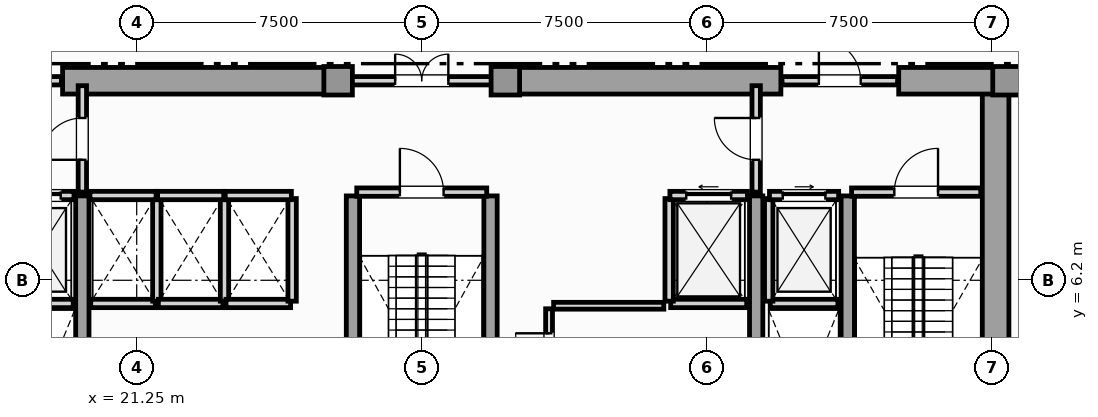
"""IFC4 building model, lengths in metres.
Left out: names, types, materials, properties, quantities, classifications, styles, units other than length and angle.
Written with IfcOpenShell. Run it as: python <this file> out.ifc"""

import sys

from ifc_helpers import new_model, si_unit, direction, frame, frame_2d, origin, origin_2d, place, context, subcontext, project, spatial, rectangle, extrude, element, fill, save


model = new_model("IFC4")
c1 = context("Model", 3, precision=1e-05, world=origin(), true_north=direction((0.0, 1.0)))
c2 = subcontext(c1, "Body", "Model", "MODEL_VIEW")
j1 = project(units=[si_unit("LENGTHUNIT", "METRE"), si_unit("PLANEANGLEUNIT", "RADIAN")], contexts=[c1])
p1 = place(None, origin())
s1 = spatial("IfcSite", under=j1, at=p1, CompositionType="ELEMENT")
p2 = place(p1, origin())
s2 = spatial("IfcBuilding", under=s1, at=p2, CompositionType="ELEMENT")
p3 = place(p2, frame((0.0, 0.0, 96.45)))
s3 = spatial("IfcBuildingStorey", under=s2, at=p3, CompositionType="ELEMENT", Elevation=96.45)
p4 = place(p3, frame((43.85, 0.92, 0.0), z_axis=(0.0, 0.0, 1.0), x_axis=(0.0, 1.0, 0.0)))
e1 = element("IfcWall", 1, at=p4, inside=s3, PredefinedType="SHEAR", context=c2, shape_type="SweptSolid", body=[
    extrude(rectangle(XDim=10.53, YDim=0.7, at=frame_2d((5.265, 0.0))), origin(), (0.0, 0.0, 1.0), 3.6),
])
for number, where, z_axis, x_axis in (
    (2, (19.3, 11.45, 0.0), (0.0, 0.0, 1.0), (1.0, 0.0, 0.0)),
    (3, (30.9, 11.45, 0.0), (0.0, 0.0, 1.0), (1.0, 0.0, 0.0)),
):
    element("IfcWall", number, at=place(p3, frame(where, z_axis=z_axis, x_axis=x_axis)), inside=s3, PredefinedType="SHEAR", context=c2, shape_type="SweptSolid", body=[
        extrude(rectangle(XDim=7.3, YDim=0.7, at=frame_2d((3.65, 0.0))), origin(), (0.0, 0.0, 1.0), 3.6),
    ])
p5 = place(p3, frame((41.3, 11.45, 0.0), z_axis=(0.0, 0.0, 1.0), x_axis=(1.0, 0.0, 0.0)))
e4 = element("IfcWall", 4, at=p5, inside=s3, PredefinedType="SHEAR", context=c2, shape_type="SweptSolid", body=[
    extrude(rectangle(XDim=2.95, YDim=0.7, at=frame_2d((1.475, 0.0))), origin(), (0.0, 0.0, 1.0), 3.6),
])
for number, where, z_axis, x_axis in (
    (5, (19.82, 0.92, 0.0), (0.0, 0.0, 1.0), (0.0, 1.0, 0.0)),
    (6, (26.94, 0.92, 0.0), (0.0, 0.0, 1.0), (0.0, 1.0, 0.0)),
    (7, (30.56, 0.92, 0.0), (0.0, 0.0, 1.0), (0.0, 1.0, 0.0)),
    (8, (37.55, 0.92, 0.0), (0.0, 0.0, 1.0), (0.0, 1.0, 0.0)),
    (9, (39.96, 0.92, 0.0), (0.0, 0.0, 1.0), (0.0, 1.0, 0.0)),
):
    element("IfcWall", number, at=place(p3, frame(where, z_axis=z_axis, x_axis=x_axis)), inside=s3, PredefinedType="SHEAR", context=c2, shape_type="SweptSolid", body=[
        extrude(rectangle(XDim=7.5, YDim=0.35, at=frame_2d((3.75, 0.0))), origin(), (0.0, 0.0, 1.0), 3.6),
    ])
for number, where, z_axis, x_axis in (
    (10, (44.15, 11.45, 0.0), (0.0, 0.0, 1.0), (1.0, 0.0, 0.0)),
    (11, (26.55, 11.45, 0.0), (0.0, 0.0, 1.0), (1.0, 0.0, 0.0)),
    (12, (30.95, 11.45, 0.0), (0.0, 0.0, 1.0), (1.0, 0.0, 0.0)),
):
    element("IfcColumn", number, at=place(p3, frame(where, z_axis=z_axis, x_axis=x_axis)), inside=s3, PredefinedType="COLUMN", context=c2, shape_type="SweptSolid", body=[
        extrude(rectangle(XDim=0.75, YDim=0.75, at=origin_2d()), origin(), (0.0, 0.0, 1.0), 3.85),
    ])
p6 = place(p3, frame((17.8, 5.59, 0.0), z_axis=(0.0, 0.0, 1.0), x_axis=(1.0, 0.0, 0.0)))
e13 = element("IfcWall", 13, at=p6, inside=s3, PredefinedType="SOLIDWALL", context=c2, shape_type="SweptSolid", body=[
    extrude(rectangle(XDim=1.78, YDim=0.22, at=frame_2d((0.89, 0.0))), origin(), (0.0, 0.0, 1.0), 3.6),
])
p7 = place(p3, frame((17.78, 8.43, 0.0), z_axis=(0.0, 0.0, 1.0), x_axis=(1.0, 0.0, 0.0)))
e14 = element("IfcWall", 14, at=p7, inside=s3, PredefinedType="SOLIDWALL", context=c2, shape_type="SweptSolid", body=[
    extrude(rectangle(XDim=1.82, YDim=0.22, at=frame_2d((0.91, 0.0))), origin(), (0.0, 0.0, 1.0), 3.6),
])
p8 = place(p7, frame((0.35, 0.0, 0.0)))
e15 = element("IfcOpeningElement", 15, at=p8, cuts=e14, PredefinedType="OPENING", context=c2, shape_type="SweptSolid", body=[
    extrude(rectangle(XDim=1.12, YDim=2.25, at=frame_2d((0.56, 1.125))), frame((0.0, 0.12, 0.0), z_axis=(0.0, -1.0, 0.0), x_axis=(1.0, 0.0, 0.0)), (0.0, 0.0, 1.0), 0.24),
])
p9 = place(p3, frame((37.92, 5.59, 0.0), z_axis=(0.0, 0.0, 1.0), x_axis=(1.0, 0.0, 0.0)))
e16 = element("IfcWall", 16, at=p9, inside=s3, PredefinedType="SOLIDWALL", context=c2, shape_type="SweptSolid", body=[
    extrude(rectangle(XDim=1.78, YDim=0.22, at=frame_2d((0.89, 0.0))), origin(), (0.0, 0.0, 1.0), 3.6),
])
p10 = place(p3, frame((37.88, 5.65, 0.0), z_axis=(0.0, 0.0, 1.0), x_axis=(0.0, 1.0, 0.0)))
e17 = element("IfcWall", 17, at=p10, inside=s3, PredefinedType="SOLIDWALL", context=c2, shape_type="SweptSolid", body=[
    extrude(rectangle(XDim=2.7, YDim=0.22, at=frame_2d((1.35, 0.0))), origin(), (0.0, 0.0, 1.0), 3.6),
])
p11 = place(p3, frame((37.9, 8.43, 0.0), z_axis=(0.0, 0.0, 1.0), x_axis=(1.0, 0.0, 0.0)))
e18 = element("IfcWall", 18, at=p11, inside=s3, PredefinedType="SOLIDWALL", context=c2, shape_type="SweptSolid", body=[
    extrude(rectangle(XDim=1.82, YDim=0.22, at=frame_2d((0.91, 0.0))), origin(), (0.0, 0.0, 1.0), 3.6),
])
p12 = place(p11, frame((0.35, 0.0, 0.0)))
e19 = element("IfcOpeningElement", 19, at=p12, cuts=e18, PredefinedType="OPENING", context=c2, shape_type="SweptSolid", body=[
    extrude(rectangle(XDim=1.12, YDim=2.25, at=frame_2d((0.56, 1.125))), frame((0.0, 0.12, 0.0), z_axis=(0.0, -1.0, 0.0), x_axis=(1.0, 0.0, 0.0)), (0.0, 0.0, 1.0), 0.24),
])
p13 = place(p3, frame((35.3, 5.59, 0.0), z_axis=(0.0, 0.0, 1.0), x_axis=(1.0, 0.0, 0.0)))
e20 = element("IfcWall", 20, at=p13, inside=s3, PredefinedType="SOLIDWALL", context=c2, shape_type="SweptSolid", body=[
    extrude(rectangle(XDim=2.0, YDim=0.22, at=frame_2d((1.0, 0.0))), origin(), (0.0, 0.0, 1.0), 3.6),
])
p14 = place(p3, frame((35.26, 5.65, 0.0), z_axis=(0.0, 0.0, 1.0), x_axis=(0.0, 1.0, 0.0)))
e21 = element("IfcWall", 21, at=p14, inside=s3, PredefinedType="SOLIDWALL", context=c2, shape_type="SweptSolid", body=[
    extrude(rectangle(XDim=2.7, YDim=0.22, at=frame_2d((1.35, 0.0))), origin(), (0.0, 0.0, 1.0), 3.6),
])
p15 = place(p3, frame((35.28, 8.43, 0.0), z_axis=(0.0, 0.0, 1.0), x_axis=(1.0, 0.0, 0.0)))
e22 = element("IfcWall", 22, at=p15, inside=s3, PredefinedType="SOLIDWALL", context=c2, shape_type="SweptSolid", body=[
    extrude(rectangle(XDim=2.04, YDim=0.22, at=frame_2d((1.02, 0.0))), origin(), (0.0, 0.0, 1.0), 3.6),
])
p16 = place(p15, frame((0.43, 0.0, 0.0)))
e23 = element("IfcOpeningElement", 23, at=p16, cuts=e22, PredefinedType="OPENING", context=c2, shape_type="SweptSolid", body=[
    extrude(rectangle(XDim=1.18, YDim=2.2, at=frame_2d((0.59, 1.1))), frame((0.0, 0.12, 0.0), z_axis=(0.0, -1.0, 0.0), x_axis=(1.0, 0.0, 0.0)), (0.0, 0.0, 1.0), 0.24),
])
p17 = place(p3, frame((20.04, 5.59, 0.0), z_axis=(0.0, 0.0, 1.0), x_axis=(1.0, 0.0, 0.0)))
e24 = element("IfcWall", 24, at=p17, inside=s3, PredefinedType="SOLIDWALL", context=c2, shape_type="SweptSolid", body=[
    extrude(rectangle(XDim=1.7, YDim=0.22, at=frame_2d((0.85, 0.0))), origin(), (0.0, 0.0, 1.0), 3.6),
])
p18 = place(p3, frame((21.78, 5.65, 0.0), z_axis=(0.0, 0.0, 1.0), x_axis=(0.0, 1.0, 0.0)))
e25 = element("IfcWall", 25, at=p18, inside=s3, PredefinedType="SOLIDWALL", context=c2, shape_type="SweptSolid", body=[
    extrude(rectangle(XDim=2.7, YDim=0.22, at=frame_2d((1.35, 0.0))), origin(), (0.0, 0.0, 1.0), 3.6),
])
p19 = place(p3, frame((20.02, 8.43, 0.0), z_axis=(0.0, 0.0, 1.0), x_axis=(1.0, 0.0, 0.0)))
e26 = element("IfcWall", 26, at=p19, inside=s3, PredefinedType="SOLIDWALL", context=c2, shape_type="SweptSolid", body=[
    extrude(rectangle(XDim=1.74, YDim=0.22, at=frame_2d((0.87, 0.0))), origin(), (0.0, 0.0, 1.0), 3.6),
])
p20 = place(p3, frame((21.82, 5.59, 0.0), z_axis=(0.0, 0.0, 1.0), x_axis=(1.0, 0.0, 0.0)))
e27 = element("IfcWall", 27, at=p20, inside=s3, PredefinedType="SOLIDWALL", context=c2, shape_type="SweptSolid", body=[
    extrude(rectangle(XDim=1.7, YDim=0.22, at=frame_2d((0.85, 0.0))), origin(), (0.0, 0.0, 1.0), 3.6),
])
p21 = place(p3, frame((23.56, 5.65, 0.0), z_axis=(0.0, 0.0, 1.0), x_axis=(0.0, 1.0, 0.0)))
e28 = element("IfcWall", 28, at=p21, inside=s3, PredefinedType="SOLIDWALL", context=c2, shape_type="SweptSolid", body=[
    extrude(rectangle(XDim=2.7, YDim=0.22, at=frame_2d((1.35, 0.0))), origin(), (0.0, 0.0, 1.0), 3.6),
])
p22 = place(p3, frame((21.8, 8.43, 0.0), z_axis=(0.0, 0.0, 1.0), x_axis=(1.0, 0.0, 0.0)))
e29 = element("IfcWall", 29, at=p22, inside=s3, PredefinedType="SOLIDWALL", context=c2, shape_type="SweptSolid", body=[
    extrude(rectangle(XDim=1.74, YDim=0.22, at=frame_2d((0.87, 0.0))), origin(), (0.0, 0.0, 1.0), 3.6),
])
p23 = place(p3, frame((23.6, 5.59, 0.0), z_axis=(0.0, 0.0, 1.0), x_axis=(1.0, 0.0, 0.0)))
e30 = element("IfcWall", 30, at=p23, inside=s3, PredefinedType="SOLIDWALL", context=c2, shape_type="SweptSolid", body=[
    extrude(rectangle(XDim=1.7, YDim=0.22, at=frame_2d((0.85, 0.0))), origin(), (0.0, 0.0, 1.0), 3.6),
])
p24 = place(p3, frame((25.34, 5.65, 0.0), z_axis=(0.0, 0.0, 1.0), x_axis=(0.0, 1.0, 0.0)))
e31 = element("IfcWall", 31, at=p24, inside=s3, PredefinedType="SOLIDWALL", context=c2, shape_type="SweptSolid", body=[
    extrude(rectangle(XDim=2.7, YDim=0.22, at=frame_2d((1.35, 0.0))), origin(), (0.0, 0.0, 1.0), 3.6),
])
p25 = place(p3, frame((23.58, 8.43, 0.0), z_axis=(0.0, 0.0, 1.0), x_axis=(1.0, 0.0, 0.0)))
e32 = element("IfcWall", 32, at=p25, inside=s3, PredefinedType="SOLIDWALL", context=c2, shape_type="SweptSolid", body=[
    extrude(rectangle(XDim=1.74, YDim=0.22, at=frame_2d((0.87, 0.0))), origin(), (0.0, 0.0, 1.0), 3.6),
])
p26 = place(p3, frame((40.06, 8.52, 0.0), z_axis=(0.0, 0.0, 1.0), x_axis=(1.0, 0.0, 0.0)))
e33 = element("IfcWall", 33, at=p26, inside=s3, PredefinedType="SOLIDWALL", context=c2, shape_type="SweptSolid", body=[
    extrude(rectangle(XDim=3.4, YDim=0.22, at=frame_2d((1.7, 0.0))), origin(), (0.0, 0.0, 1.0), 3.6),
])
p27 = place(p26, frame((1.125, 0.0, 0.0)))
e34 = element("IfcOpeningElement", 34, at=p27, cuts=e33, PredefinedType="OPENING", context=c2, shape_type="SweptSolid", body=[
    extrude(rectangle(XDim=1.15, YDim=2.2, at=frame_2d((0.575, 1.1))), frame((0.0, 0.12, 0.0), z_axis=(0.0, -1.0, 0.0), x_axis=(1.0, 0.0, 0.0)), (0.0, 0.0, 1.0), 0.24),
])
p28 = place(p3, frame((27.04, 8.52, 0.0), z_axis=(0.0, 0.0, 1.0), x_axis=(1.0, 0.0, 0.0)))
e35 = element("IfcWall", 35, at=p28, inside=s3, PredefinedType="SOLIDWALL", context=c2, shape_type="SweptSolid", body=[
    extrude(rectangle(XDim=3.42, YDim=0.22, at=frame_2d((1.71, 0.0))), origin(), (0.0, 0.0, 1.0), 3.6),
])
p29 = place(p28, frame((1.135, 0.0, 0.0)))
e36 = element("IfcOpeningElement", 36, at=p29, cuts=e35, PredefinedType="OPENING", context=c2, shape_type="SweptSolid", body=[
    extrude(rectangle(XDim=1.15, YDim=2.2, at=frame_2d((0.575, 1.1))), frame((0.0, 0.12, 0.0), z_axis=(0.0, -1.0, 0.0), x_axis=(1.0, 0.0, 0.0)), (0.0, 0.0, 1.0), 0.24),
])
p30 = place(p3, frame((19.82, 8.52, 0.0), z_axis=(0.0, 0.0, 1.0), x_axis=(0.0, 1.0, 0.0)))
e37 = element("IfcWall", 37, at=p30, inside=s3, PredefinedType="SOLIDWALL", context=c2, shape_type="SweptSolid", body=[
    extrude(rectangle(XDim=2.8, YDim=0.22, at=frame_2d((1.4, 0.0))), origin(), (0.0, 0.0, 1.0), 3.056),
])
p31 = place(p30, frame((0.85, 0.0, 0.0)))
e38 = element("IfcOpeningElement", 38, at=p31, cuts=e37, PredefinedType="OPENING", context=c2, shape_type="SweptSolid", body=[
    extrude(rectangle(XDim=1.1, YDim=2.2, at=frame_2d((0.55, 1.1))), frame((0.0, 0.12, 0.0), z_axis=(0.0, -1.0, 0.0), x_axis=(1.0, 0.0, 0.0)), (0.0, 0.0, 1.0), 0.24),
])
p32 = place(p3, frame((37.55, 8.52, 0.0), z_axis=(0.0, 0.0, 1.0), x_axis=(0.0, 1.0, 0.0)))
e39 = element("IfcWall", 39, at=p32, inside=s3, PredefinedType="SOLIDWALL", context=c2, shape_type="SweptSolid", body=[
    extrude(rectangle(XDim=2.8, YDim=0.22, at=frame_2d((1.4, 0.0))), origin(), (0.0, 0.0, 1.0), 3.056),
])
p33 = place(p32, frame((0.85, 0.0, 0.0)))
e40 = element("IfcOpeningElement", 40, at=p33, cuts=e39, PredefinedType="OPENING", context=c2, shape_type="SweptSolid", body=[
    extrude(rectangle(XDim=1.1, YDim=2.2, at=frame_2d((0.55, 1.1))), frame((0.0, 0.12, 0.0), z_axis=(0.0, -1.0, 0.0), x_axis=(1.0, 0.0, 0.0)), (0.0, 0.0, 1.0), 0.24),
])
p34 = place(p3, frame((16.23, 11.45, 0.0), z_axis=(0.0, 0.0, 1.0), x_axis=(1.0, 0.0, 0.0)))
e41 = element("IfcWall", 41, at=p34, inside=s3, PredefinedType="SOLIDWALL", context=c2, shape_type="SweptSolid", body=[
    extrude(rectangle(XDim=3.04, YDim=0.22, at=frame_2d((1.52, 0.0))), origin(), (0.0, 0.0, 1.0), 3.6),
])
p35 = place(p34, frame((0.97, 0.0, 0.0)))
e42 = element("IfcOpeningElement", 42, at=p35, cuts=e41, PredefinedType="OPENING", context=c2, shape_type="SweptSolid", body=[
    extrude(rectangle(XDim=1.1, YDim=2.2, at=frame_2d((0.55, 1.1))), frame((0.0, 0.12, 0.0), z_axis=(0.0, -1.0, 0.0), x_axis=(1.0, 0.0, 0.0)), (0.0, 0.0, 1.0), 0.24),
])
p36 = place(p3, frame((26.63, 11.45, 0.0), z_axis=(0.0, 0.0, 1.0), x_axis=(1.0, 0.0, 0.0)))
e43 = element("IfcWall", 43, at=p36, inside=s3, PredefinedType="SOLIDWALL", context=c2, shape_type="SweptSolid", body=[
    extrude(rectangle(XDim=4.24, YDim=0.22, at=frame_2d((2.12, 0.0))), origin(), (0.0, 0.0, 1.0), 3.6),
])
p37 = place(p36, frame((1.42, 0.0, 0.0)))
e44 = element("IfcOpeningElement", 44, at=p37, cuts=e43, PredefinedType="OPENING", context=c2, shape_type="SweptSolid", body=[
    extrude(rectangle(XDim=1.4, YDim=2.2, at=frame_2d((0.7, 1.1))), frame((0.0, 0.12, 0.0), z_axis=(0.0, -1.0, 0.0), x_axis=(1.0, 0.0, 0.0)), (0.0, 0.0, 1.0), 0.24),
])
p38 = place(p3, frame((38.23, 11.45, 0.0), z_axis=(0.0, 0.0, 1.0), x_axis=(1.0, 0.0, 0.0)))
e45 = element("IfcWall", 45, at=p38, inside=s3, PredefinedType="SOLIDWALL", context=c2, shape_type="SweptSolid", body=[
    extrude(rectangle(XDim=3.04, YDim=0.22, at=frame_2d((1.52, 0.0))), origin(), (0.0, 0.0, 1.0), 3.6),
])
p39 = place(p38, frame((0.97, 0.0, 0.0)))
e46 = element("IfcOpeningElement", 46, at=p39, cuts=e45, PredefinedType="OPENING", context=c2, shape_type="SweptSolid", body=[
    extrude(rectangle(XDim=1.1, YDim=2.2, at=frame_2d((0.55, 1.1))), frame((0.0, 0.12, 0.0), z_axis=(0.0, -1.0, 0.0), x_axis=(1.0, 0.0, 0.0)), (0.0, 0.0, 1.0), 0.24),
])
p40 = place(p3, frame((32.1, 3.28, 0.0), z_axis=(0.0, 0.0, 1.0), x_axis=(0.0, 1.0, 0.0)))
e47 = element("IfcWall", 47, at=p40, inside=s3, PredefinedType="PARTITIONING", context=c2, shape_type="SweptSolid", body=[
    extrude(rectangle(XDim=2.17, YDim=0.18, at=frame_2d((1.085, 0.0))), origin(), (0.0, 0.0, 1.0), 3.6),
])
p41 = place(p40, frame((0.645, 0.0, 0.0)))
e48 = element("IfcOpeningElement", 48, at=p41, cuts=e47, PredefinedType="OPENING", context=c2, shape_type="SweptSolid", body=[
    extrude(rectangle(XDim=0.88, YDim=2.05, at=frame_2d((0.44, 1.025))), frame((0.0, 0.1, 0.0), z_axis=(0.0, -1.0, 0.0), x_axis=(1.0, 0.0, 0.0)), (0.0, 0.0, 1.0), 0.2),
])
p42 = place(p3, frame((32.22, 5.53, 0.0), z_axis=(0.0, 0.0, 1.0), x_axis=(1.0, 0.0, 0.0)))
e49 = element("IfcWall", 49, at=p42, inside=s3, PredefinedType="PARTITIONING", context=c2, shape_type="SweptSolid", body=[
    extrude(rectangle(XDim=2.9, YDim=0.18, at=frame_2d((1.45, 0.0))), origin(), (0.0, 0.0, 1.0), 3.6),
])
p43 = place(p3, frame((44.355, 11.6, 0.0), z_axis=(0.0, 0.0, 1.0), x_axis=(1.0, 0.0, 0.0)))
e50 = element("IfcWall", 50, at=p43, inside=s3, PredefinedType="PARTITIONING", context=c2, shape_type="SweptSolid", body=[
    extrude(rectangle(XDim=10.335, YDim=0.18, at=frame_2d((5.167, 0.0))), origin(), (0.0, 0.0, 1.0), 3.6),
])
p44 = place(p43, frame((4.667, 0.0, 0.0)))
e51 = element("IfcOpeningElement", 51, at=p44, cuts=e50, PredefinedType="OPENING", context=c2, shape_type="SweptSolid", body=[
    extrude(rectangle(XDim=1.0, YDim=2.15, at=frame_2d((0.5, 1.075))), frame((0.0, 0.1, 0.0), z_axis=(0.0, -1.0, 0.0), x_axis=(1.0, 0.0, 0.0)), (0.0, 0.0, 1.0), 0.2),
])
p45 = place(p8, origin())
e52 = element("IfcDoor", 52, at=p45, inside=s3, OperationType="SLIDING_TO_LEFT", PredefinedType="DOOR", context=c2, shape_type="SweptSolid", body=[
    extrude(rectangle(XDim=1.12, YDim=2.25, at=frame_2d((0.56, 1.125))), frame((0.0, 0.025, 0.0), z_axis=(0.0, -1.0, 0.0), x_axis=(1.0, 0.0, 0.0)), (0.0, 0.0, 1.0), 0.05),
])
fill(e15, e52)
p46 = place(p12, origin())
e53 = element("IfcDoor", 53, at=p46, inside=s3, OperationType="SLIDING_TO_RIGHT", PredefinedType="DOOR", context=c2, shape_type="SweptSolid", body=[
    extrude(rectangle(XDim=1.12, YDim=2.25, at=frame_2d((0.56, 1.125))), frame((0.0, 0.025, 0.0), z_axis=(0.0, -1.0, 0.0), x_axis=(1.0, 0.0, 0.0)), (0.0, 0.0, 1.0), 0.05),
])
fill(e19, e53)
p47 = place(p16, origin())
e54 = element("IfcDoor", 54, at=p47, inside=s3, OperationType="SLIDING_TO_LEFT", PredefinedType="DOOR", context=c2, shape_type="SweptSolid", body=[
    extrude(rectangle(XDim=1.18, YDim=2.2, at=frame_2d((0.59, 1.1))), frame((0.0, 0.025, 0.0), z_axis=(0.0, -1.0, 0.0), x_axis=(1.0, 0.0, 0.0)), (0.0, 0.0, 1.0), 0.05),
])
fill(e23, e54)
p48 = place(p27, origin())
e55 = element("IfcDoor", 55, at=p48, inside=s3, OperationType="SINGLE_SWING_RIGHT", PredefinedType="DOOR", context=c2, shape_type="SweptSolid", body=[
    extrude(rectangle(XDim=1.15, YDim=2.2, at=frame_2d((0.575, 1.1))), frame((0.0, 0.025, 0.0), z_axis=(0.0, -1.0, 0.0), x_axis=(1.0, 0.0, 0.0)), (0.0, 0.0, 1.0), 0.05),
])
fill(e34, e55)
p49 = place(p29, origin())
e56 = element("IfcDoor", 56, at=p49, inside=s3, OperationType="SINGLE_SWING_LEFT", PredefinedType="DOOR", context=c2, shape_type="SweptSolid", body=[
    extrude(rectangle(XDim=1.15, YDim=2.2, at=frame_2d((0.575, 1.1))), frame((0.0, 0.025, 0.0), z_axis=(0.0, -1.0, 0.0), x_axis=(1.0, 0.0, 0.0)), (0.0, 0.0, 1.0), 0.05),
])
fill(e36, e56)
p50 = place(p31, origin())
e57 = element("IfcDoor", 57, at=p50, inside=s3, OperationType="SINGLE_SWING_LEFT", PredefinedType="DOOR", context=c2, shape_type="SweptSolid", body=[
    extrude(rectangle(XDim=1.1, YDim=2.2, at=frame_2d((0.55, 1.1))), frame((0.0, 0.025, 0.0), z_axis=(0.0, -1.0, 0.0), x_axis=(1.0, 0.0, 0.0)), (0.0, 0.0, 1.0), 0.05),
])
fill(e38, e57)
p51 = place(p33, origin())
e58 = element("IfcDoor", 58, at=p51, inside=s3, OperationType="SINGLE_SWING_RIGHT", PredefinedType="DOOR", context=c2, shape_type="SweptSolid", body=[
    extrude(rectangle(XDim=1.1, YDim=2.2, at=frame_2d((0.55, 1.1))), frame((0.0, 0.025, 0.0), z_axis=(0.0, -1.0, 0.0), x_axis=(1.0, 0.0, 0.0)), (0.0, 0.0, 1.0), 0.05),
])
fill(e40, e58)
p52 = place(p37, origin())
e59 = element("IfcDoor", 59, at=p52, inside=s3, OperationType="DOUBLE_DOOR_SINGLE_SWING", PredefinedType="DOOR", context=c2, shape_type="SweptSolid", body=[
    extrude(rectangle(XDim=1.4, YDim=2.2, at=frame_2d((0.7, 1.1))), frame((0.0, 0.025, 0.0), z_axis=(0.0, -1.0, 0.0), x_axis=(1.0, 0.0, 0.0)), (0.0, 0.0, 1.0), 0.05),
])
fill(e44, e59)
p53 = place(p39, origin())
e60 = element("IfcDoor", 60, at=p53, inside=s3, OperationType="SINGLE_SWING_LEFT", PredefinedType="DOOR", context=c2, shape_type="SweptSolid", body=[
    extrude(rectangle(XDim=1.1, YDim=2.2, at=frame_2d((0.55, 1.1))), frame((0.0, 0.025, 0.0), z_axis=(0.0, -1.0, 0.0), x_axis=(1.0, 0.0, 0.0)), (0.0, 0.0, 1.0), 0.05),
])
fill(e46, e60)
p54 = place(p41, origin())
e61 = element("IfcDoor", 61, at=p54, inside=s3, OperationType="SINGLE_SWING_RIGHT", PredefinedType="DOOR", context=c2, shape_type="SweptSolid", body=[
    extrude(rectangle(XDim=0.88, YDim=2.05, at=frame_2d((0.44, 1.025))), frame((0.0, 0.025, 0.0), z_axis=(0.0, -1.0, 0.0), x_axis=(1.0, 0.0, 0.0)), (0.0, 0.0, 1.0), 0.05),
])
fill(e48, e61)
save(model, sys.argv[1])
